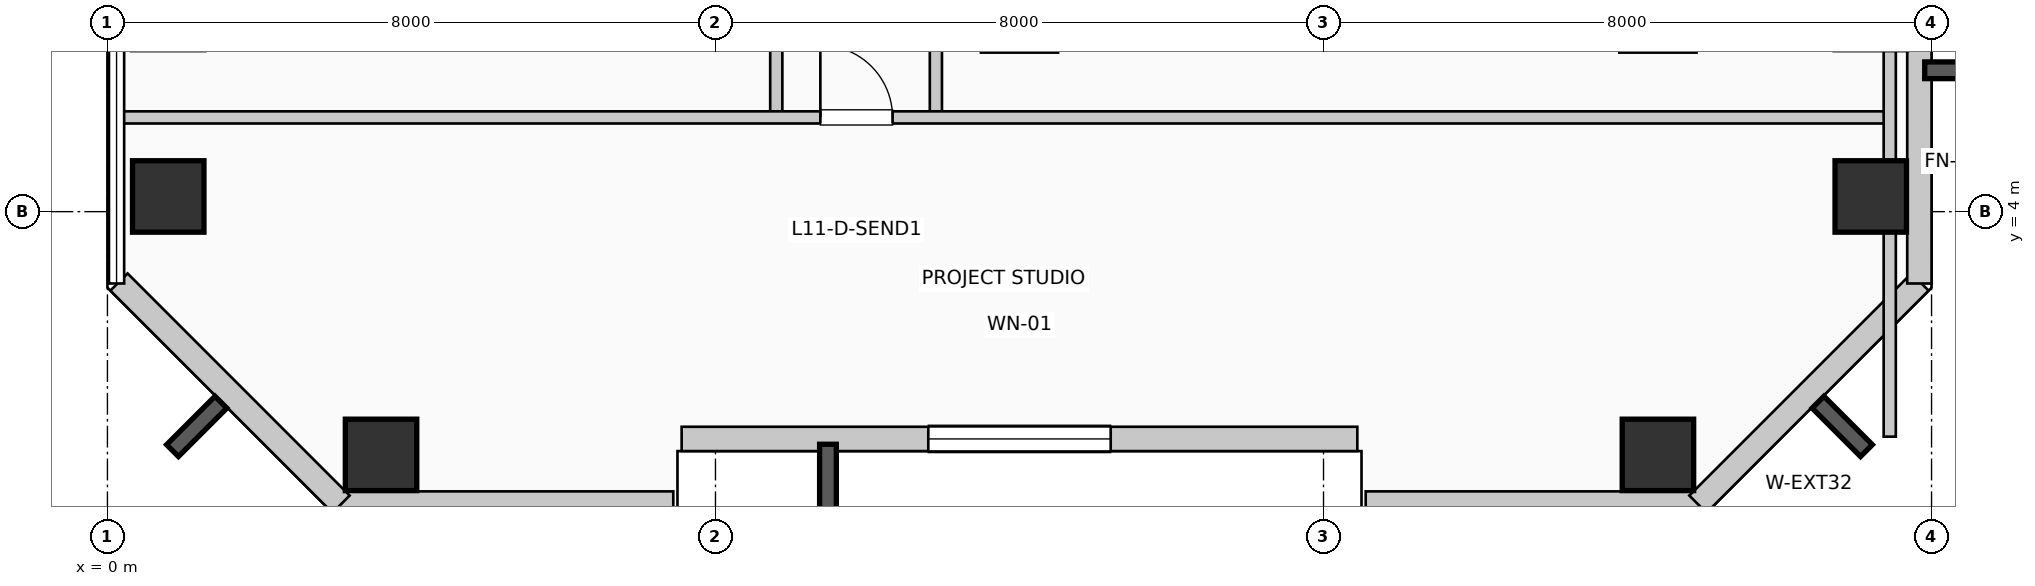
"""IFC4 building model, lengths in metres.
Left out: names, types, materials, properties, quantities, classifications, styles, units other than length and angle.
Written with IfcOpenShell. Run it as: python <this file> out.ifc"""

import sys

from ifc_helpers import new_model, si_unit, direction, frame, frame_2d, origin, origin_2d, place, context, subcontext, project, spatial, rectangle, extrude, element, fill, save


model = new_model("IFC4")
c1 = context("Model", 3, precision=1e-05, world=origin(), true_north=direction((0.0, 1.0)))
c2 = subcontext(c1, "Body", "Model", "MODEL_VIEW")
j1 = project(units=[si_unit("LENGTHUNIT", "METRE"), si_unit("PLANEANGLEUNIT", "RADIAN")], contexts=[c1])
p1 = place(None, origin())
s1 = spatial("IfcSite", under=j1, at=p1, CompositionType="ELEMENT")
p2 = place(p1, origin())
s2 = spatial("IfcBuilding", under=s1, at=p2, CompositionType="ELEMENT")
p3 = place(p2, frame((0.0, 0.0, 50.16)))
s3 = spatial("IfcBuildingStorey", under=s2, at=p3, CompositionType="ELEMENT", Elevation=50.16)
for number, where, z_axis, x_axis in (
    (1, (0.8, 4.2, 0.0), (0.0, 0.0, 1.0), (1.0, 0.0, 0.0)),
    (2, (3.6, 0.8, 0.0), (0.0, 0.0, 1.0), (1.0, 0.0, 0.0)),
    (3, (20.4, 0.8, 0.0), (0.0, 0.0, 1.0), (1.0, 0.0, 0.0)),
    (4, (23.2, 4.2, 0.0), (0.0, 0.0, 1.0), (1.0, 0.0, 0.0)),
):
    element("IfcColumn", number, at=place(p3, frame(where, z_axis=z_axis, x_axis=x_axis)), inside=s3, PredefinedType="COLUMN", context=c2, shape_type="SweptSolid", body=[
        extrude(rectangle(XDim=0.94, YDim=0.94, at=origin_2d()), origin(), (0.0, 0.0, 1.0), 3.96),
    ])
p4 = place(p3, frame((3.055, 0.16, 0.0), z_axis=(0.0, 0.0, 1.0), x_axis=(1.0, 0.0, 0.0)))
e5 = element("IfcWall", 5, at=p4, inside=s3, PredefinedType="SOLIDWALL", context=c2, shape_type="SweptSolid", body=[
    extrude(rectangle(XDim=4.39, YDim=0.32, at=frame_2d((2.195, 0.0))), origin(), (0.0, 0.0, 1.0), 3.71),
])
p5 = place(p3, frame((7.555, 1.01, 0.0), z_axis=(0.0, 0.0, 1.0), x_axis=(1.0, 0.0, 0.0)))
e6 = element("IfcWall", 6, at=p5, inside=s3, PredefinedType="SOLIDWALL", context=c2, shape_type="SweptSolid", body=[
    extrude(rectangle(XDim=8.89, YDim=0.32, at=frame_2d((4.445, 0.0))), origin(), (0.0, 0.0, 1.0), 3.71),
])
p6 = place(p5, frame((3.245, 0.0, 0.85)))
e7 = element("IfcOpeningElement", 7, at=p6, cuts=e6, PredefinedType="OPENING", context=c2, shape_type="SweptSolid", body=[
    extrude(rectangle(XDim=2.4, YDim=2.05, at=frame_2d((1.2, 1.025))), frame((0.0, 0.17, 0.0), z_axis=(0.0, -1.0, 0.0), x_axis=(1.0, 0.0, 0.0)), (0.0, 0.0, 1.0), 0.34),
])
p7 = place(p3, frame((16.555, 0.16, 0.0), z_axis=(0.0, 0.0, 1.0), x_axis=(1.0, 0.0, 0.0)))
e8 = element("IfcWall", 8, at=p7, inside=s3, PredefinedType="SOLIDWALL", context=c2, shape_type="SweptSolid", body=[
    extrude(rectangle(XDim=4.39, YDim=0.32, at=frame_2d((2.195, 0.0))), origin(), (0.0, 0.0, 1.0), 3.71),
])
p8 = place(p3, frame((20.926, 0.152, 0.0), z_axis=(0.0, 0.0, 1.0), x_axis=(0.707106781187, 0.707106781187, 0.0)))
e9 = element("IfcWall", 9, at=p8, inside=s3, PredefinedType="SOLIDWALL", context=c2, shape_type="SweptSolid", body=[
    extrude(rectangle(XDim=4.133, YDim=0.32, at=frame_2d((2.066, 0.0))), origin(), (0.0, 0.0, 1.0), 3.71),
])
p9 = place(p3, frame((23.84, 3.055, 0.0), z_axis=(0.0, 0.0, 1.0), x_axis=(0.0, 1.0, 0.0)))
e10 = element("IfcWall", 10, at=p9, inside=s3, PredefinedType="SOLIDWALL", context=c2, shape_type="SweptSolid", body=[
    extrude(rectangle(XDim=12.89, YDim=0.32, at=frame_2d((6.445, 0.0))), origin(), (0.0, 0.0, 1.0), 3.71),
])
p10 = place(p3, frame((0.152, 3.074, 0.0), z_axis=(0.0, 0.0, 1.0), x_axis=(0.707106781187, -0.707106781187, 0.0)))
e11 = element("IfcWall", 11, at=p10, inside=s3, PredefinedType="SOLIDWALL", context=c2, shape_type="SweptSolid", body=[
    extrude(rectangle(XDim=4.133, YDim=0.32, at=frame_2d((2.066, 0.0))), origin(), (0.0, 0.0, 1.0), 3.71),
])
p11 = place(p3, frame((8.8, 5.24, 0.0), z_axis=(0.0, 0.0, 1.0), x_axis=(0.0, 1.0, 0.0)))
e12 = element("IfcWall", 12, at=p11, inside=s3, PredefinedType="PARTITIONING", context=c2, shape_type="SweptSolid", body=[
    extrude(rectangle(XDim=24.16, YDim=0.16, at=frame_2d((12.08, 0.0))), origin(), (0.0, 0.0, 1.0), 3.71),
])
p12 = place(p11, frame((3.495, 0.0, 0.0), z_axis=(0.0, 0.0, 1.0), x_axis=(-1.0, 0.0, 0.0)))
e13 = element("IfcOpeningElement", 13, at=p12, cuts=e12, PredefinedType="OPENING", context=c2, shape_type="SweptSolid", body=[
    extrude(rectangle(XDim=0.95, YDim=2.15, at=frame_2d((0.475, 1.075))), frame((0.0, 0.09, 0.0), z_axis=(0.0, -1.0, 0.0), x_axis=(1.0, 0.0, 0.0)), (0.0, 0.0, 1.0), 0.18),
])
p13 = place(p11, frame((10.018, 0.0, 0.0), z_axis=(0.0, 0.0, 1.0), x_axis=(-1.0, 0.0, 0.0)))
e14 = element("IfcOpeningElement", 14, at=p13, cuts=e12, PredefinedType="OPENING", context=c2, shape_type="SweptSolid", body=[
    extrude(rectangle(XDim=0.95, YDim=2.15, at=frame_2d((0.475, 1.075))), frame((0.0, 0.09, 0.0), z_axis=(0.0, -1.0, 0.0), x_axis=(1.0, 0.0, 0.0)), (0.0, 0.0, 1.0), 0.18),
])
p14 = place(p11, frame((16.662, 0.0, 0.0), z_axis=(0.0, 0.0, 1.0), x_axis=(-1.0, 0.0, 0.0)))
e15 = element("IfcOpeningElement", 15, at=p14, cuts=e12, PredefinedType="OPENING", context=c2, shape_type="SweptSolid", body=[
    extrude(rectangle(XDim=0.95, YDim=2.15, at=frame_2d((0.475, 1.075))), frame((0.0, 0.09, 0.0), z_axis=(0.0, -1.0, 0.0), x_axis=(1.0, 0.0, 0.0)), (0.0, 0.0, 1.0), 0.18),
])
p15 = place(p11, frame((22.219, 0.0, 0.0), z_axis=(0.0, 0.0, 1.0), x_axis=(-1.0, 0.0, 0.0)))
e16 = element("IfcOpeningElement", 16, at=p15, cuts=e12, PredefinedType="OPENING", context=c2, shape_type="SweptSolid", body=[
    extrude(rectangle(XDim=0.95, YDim=2.15, at=frame_2d((0.475, 1.075))), frame((0.0, 0.09, 0.0), z_axis=(0.0, -1.0, 0.0), x_axis=(1.0, 0.0, 0.0)), (0.0, 0.0, 1.0), 0.18),
])
p16 = place(p3, frame((10.9, 5.24, 0.0), z_axis=(0.0, 0.0, 1.0), x_axis=(0.0, 1.0, 0.0)))
e17 = element("IfcWall", 17, at=p16, inside=s3, PredefinedType="PARTITIONING", context=c2, shape_type="SweptSolid", body=[
    extrude(rectangle(XDim=24.16, YDim=0.16, at=frame_2d((12.08, 0.0))), origin(), (0.0, 0.0, 1.0), 3.71),
])
p17 = place(p16, frame((3.753, 0.0, 0.0)))
e18 = element("IfcOpeningElement", 18, at=p17, cuts=e17, PredefinedType="OPENING", context=c2, shape_type="SweptSolid", body=[
    extrude(rectangle(XDim=0.95, YDim=2.15, at=frame_2d((0.475, 1.075))), frame((0.0, 0.09, 0.0), z_axis=(0.0, -1.0, 0.0), x_axis=(1.0, 0.0, 0.0)), (0.0, 0.0, 1.0), 0.18),
])
p18 = place(p16, frame((11.209, 0.0, 0.0)))
e19 = element("IfcOpeningElement", 19, at=p18, cuts=e17, PredefinedType="OPENING", context=c2, shape_type="SweptSolid", body=[
    extrude(rectangle(XDim=0.95, YDim=2.15, at=frame_2d((0.475, 1.075))), frame((0.0, 0.09, 0.0), z_axis=(0.0, -1.0, 0.0), x_axis=(1.0, 0.0, 0.0)), (0.0, 0.0, 1.0), 0.18),
])
p19 = place(p16, frame((20.061, 0.0, 0.0)))
e20 = element("IfcOpeningElement", 20, at=p19, cuts=e17, PredefinedType="OPENING", context=c2, shape_type="SweptSolid", body=[
    extrude(rectangle(XDim=0.95, YDim=2.15, at=frame_2d((0.475, 1.075))), frame((0.0, 0.09, 0.0), z_axis=(0.0, -1.0, 0.0), x_axis=(1.0, 0.0, 0.0)), (0.0, 0.0, 1.0), 0.18),
])
p20 = place(p3, frame((0.19, 5.24, 0.0), z_axis=(0.0, 0.0, 1.0), x_axis=(1.0, 0.0, 0.0)))
e21 = element("IfcWall", 21, at=p20, inside=s3, PredefinedType="PARTITIONING", context=c2, shape_type="SweptSolid", body=[
    extrude(rectangle(XDim=23.26, YDim=0.16, at=frame_2d((11.63, 0.0))), origin(), (0.0, 0.0, 1.0), 3.71),
])
p21 = place(p20, frame((9.19, 0.0, 0.0)))
e22 = element("IfcOpeningElement", 22, at=p21, cuts=e21, PredefinedType="OPENING", context=c2, shape_type="SweptSolid", body=[
    extrude(rectangle(XDim=0.95, YDim=2.15, at=frame_2d((0.475, 1.075))), frame((0.0, 0.09, 0.0), z_axis=(0.0, -1.0, 0.0), x_axis=(1.0, 0.0, 0.0)), (0.0, 0.0, 1.0), 0.18),
])
p22 = place(p3, frame((23.45, 1.04, 0.0), z_axis=(0.0, 0.0, 1.0), x_axis=(0.0, 1.0, 0.0)))
e23 = element("IfcWall", 23, at=p22, inside=s3, PredefinedType="PARTITIONING", context=c2, shape_type="SweptSolid", body=[
    extrude(rectangle(XDim=28.36, YDim=0.16, at=frame_2d((14.18, 0.0))), origin(), (0.0, 0.0, 1.0), 2.995),
])
p23 = place(p6, origin())
e24 = element("IfcWindow", 24, at=p23, inside=s3, PartitioningType="SINGLE_PANEL", PredefinedType="WINDOW", context=c2, shape_type="SweptSolid", body=[
    extrude(rectangle(XDim=2.4, YDim=2.05, at=frame_2d((1.2, 1.025))), frame((0.0, 0.03, 0.0), z_axis=(0.0, -1.0, 0.0), x_axis=(1.0, 0.0, 0.0)), (0.0, 0.0, 1.0), 0.06),
])
fill(e7, e24)
p24 = place(p21, origin())
e25 = element("IfcDoor", 25, at=p24, inside=s3, OperationType="SINGLE_SWING_LEFT", PredefinedType="DOOR", context=c2, shape_type="SweptSolid", body=[
    extrude(rectangle(XDim=0.95, YDim=2.15, at=frame_2d((0.475, 1.075))), frame((0.0, 0.025, 0.0), z_axis=(0.0, -1.0, 0.0), x_axis=(1.0, 0.0, 0.0)), (0.0, 0.0, 1.0), 0.05),
])
fill(e22, e25)
save(model, sys.argv[1])
